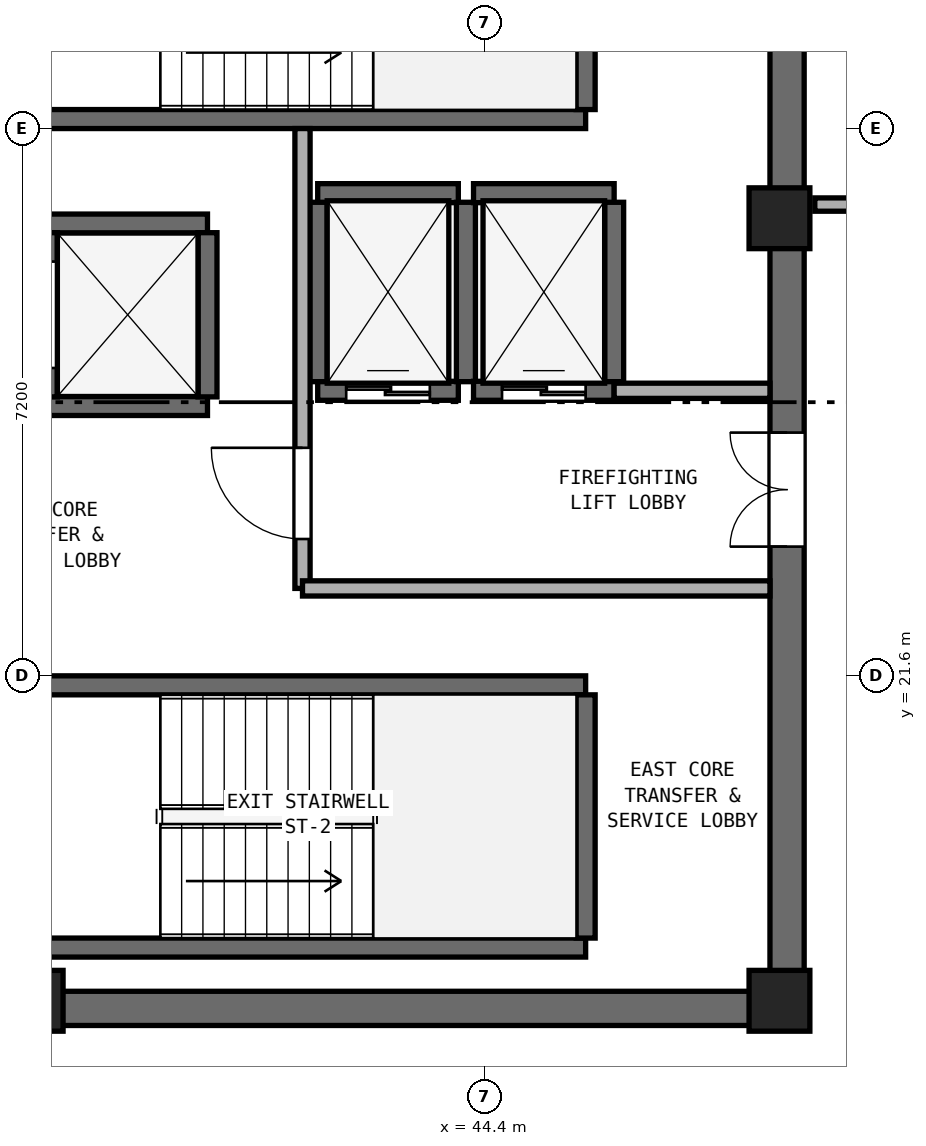
"""IFC4 building model, lengths in metres.
Left out: names, types, materials, properties, quantities, classifications, styles, units other than length and angle.
Written with IfcOpenShell. Run it as: python <this file> out.ifc"""

import sys

from ifc_helpers import new_model, si_unit, direction, frame, frame_2d, origin, origin_2d, place, context, subcontext, project, spatial, rectangle, extrude, element, fill, save


model = new_model("IFC4")
c1 = context("Model", 3, precision=1e-05, world=origin(), true_north=direction((0.0, 1.0)))
c2 = subcontext(c1, "Body", "Model", "MODEL_VIEW")
j1 = project(units=[si_unit("LENGTHUNIT", "METRE"), si_unit("PLANEANGLEUNIT", "RADIAN")], contexts=[c1])
p1 = place(None, origin())
s1 = spatial("IfcSite", under=j1, at=p1, CompositionType="ELEMENT")
p2 = place(p1, origin())
s2 = spatial("IfcBuilding", under=s1, at=p2, CompositionType="ELEMENT")
p3 = place(p2, frame((0.0, 0.0, 266.8)))
s3 = spatial("IfcBuildingStorey", under=s2, at=p3, CompositionType="ELEMENT", Elevation=266.8)
p4 = place(p3, frame((25.4, 17.225, 0.0), z_axis=(0.0, 0.0, 1.0), x_axis=(1.0, 0.0, 0.0)))
e1 = element("IfcWall", 1, at=p4, inside=s3, PredefinedType="SHEAR", context=c2, shape_type="SweptSolid", body=[
    extrude(rectangle(XDim=23.2, YDim=0.45, at=frame_2d((11.6, 0.0))), origin(), (0.0, 0.0, 1.0), 3.51),
])
p5 = place(p3, frame((48.375, 17.45, 0.0), z_axis=(0.0, 0.0, 1.0), x_axis=(0.0, 1.0, 0.0)))
e2 = element("IfcWall", 2, at=p5, inside=s3, PredefinedType="SHEAR", context=c2, shape_type="SweptSolid", body=[
    extrude(rectangle(XDim=15.5, YDim=0.45, at=frame_2d((7.75, 0.0))), origin(), (0.0, 0.0, 1.0), 3.51),
])
p6 = place(p5, frame((5.85, 0.0, 0.0)))
e3 = element("IfcOpeningElement", 3, at=p6, cuts=e2, PredefinedType="OPENING", context=c2, shape_type="SweptSolid", body=[
    extrude(rectangle(XDim=1.5, YDim=2.15, at=frame_2d((0.75, 1.075))), frame((0.0, 0.235, 0.0), z_axis=(0.0, -1.0, 0.0), x_axis=(1.0, 0.0, 0.0)), (0.0, 0.0, 1.0), 0.47),
])
for number, where, z_axis, x_axis in (
    (4, (38.45, 17.325, 0.0), (0.0, 0.0, 1.0), (1.0, 0.0, 0.0)),
    (5, (48.275, 17.325, 0.0), (0.0, 0.0, 1.0), (1.0, 0.0, 0.0)),
    (6, (48.275, 27.62, 0.0), (0.0, 0.0, 1.0), (1.0, 0.0, 0.0)),
):
    element("IfcColumn", number, at=place(p3, frame(where, z_axis=z_axis, x_axis=x_axis)), inside=s3, PredefinedType="PILASTER", context=c2, shape_type="SweptSolid", body=[
        extrude(rectangle(XDim=0.8, YDim=0.8, at=origin_2d()), origin(), (0.0, 0.0, 1.0), 3.8),
    ])
p7 = place(p3, frame((38.425, 28.925, 0.0), z_axis=(0.0, 0.0, 1.0), x_axis=(1.0, 0.0, 0.0)))
e7 = element("IfcWall", 7, at=p7, inside=s3, PredefinedType="SHEAR", context=c2, shape_type="SweptSolid", body=[
    extrude(rectangle(XDim=7.3, YDim=0.25, at=frame_2d((3.65, 0.0))), origin(), (0.0, 0.0, 1.0), 3.51),
])
p8 = place(p3, frame((45.725, 29.05, 0.0), z_axis=(0.0, 0.0, 1.0), x_axis=(0.0, 1.0, 0.0)))
e8 = element("IfcWall", 8, at=p8, inside=s3, PredefinedType="SHEAR", context=c2, shape_type="SweptSolid", body=[
    extrude(rectangle(XDim=3.2, YDim=0.25, at=frame_2d((1.6, 0.0))), origin(), (0.0, 0.0, 1.0), 3.51),
])
for number, where, z_axis, x_axis in (
    (9, (38.425, 18.025, 0.0), (0.0, 0.0, 1.0), (1.0, 0.0, 0.0)),
    (10, (38.425, 21.475, 0.0), (0.0, 0.0, 1.0), (1.0, 0.0, 0.0)),
):
    element("IfcWall", number, at=place(p3, frame(where, z_axis=z_axis, x_axis=x_axis)), inside=s3, PredefinedType="SHEAR", context=c2, shape_type="SweptSolid", body=[
        extrude(rectangle(XDim=7.3, YDim=0.25, at=frame_2d((3.65, 0.0))), origin(), (0.0, 0.0, 1.0), 3.51),
    ])
p9 = place(p3, frame((45.725, 18.15, 0.0), z_axis=(0.0, 0.0, 1.0), x_axis=(0.0, 1.0, 0.0)))
e11 = element("IfcWall", 11, at=p9, inside=s3, PredefinedType="SHEAR", context=c2, shape_type="SweptSolid", body=[
    extrude(rectangle(XDim=3.2, YDim=0.25, at=frame_2d((1.6, 0.0))), origin(), (0.0, 0.0, 1.0), 3.51),
])
p10 = place(p3, frame((42.2, 25.35, 0.0), z_axis=(0.0, 0.0, 1.0), x_axis=(1.0, 0.0, 0.0)))
e12 = element("IfcWall", 12, at=p10, inside=s3, PredefinedType="SHEAR", context=c2, shape_type="SweptSolid", body=[
    extrude(rectangle(XDim=1.85, YDim=0.25, at=frame_2d((0.925, 0.0))), origin(), (0.0, 0.0, 1.0), 3.51),
])
p11 = place(p10, frame((0.375, 0.0, 0.0)))
e13 = element("IfcOpeningElement", 13, at=p11, cuts=e12, PredefinedType="OPENING", context=c2, shape_type="SweptSolid", body=[
    extrude(rectangle(XDim=1.1, YDim=2.15, at=frame_2d((0.55, 1.075))), frame((0.0, 0.135, 0.0), z_axis=(0.0, -1.0, 0.0), x_axis=(1.0, 0.0, 0.0)), (0.0, 0.0, 1.0), 0.27),
])
p12 = place(p3, frame((42.2, 27.95, 0.0), z_axis=(0.0, 0.0, 1.0), x_axis=(1.0, 0.0, 0.0)))
e14 = element("IfcWall", 14, at=p12, inside=s3, PredefinedType="SHEAR", context=c2, shape_type="SweptSolid", body=[
    extrude(rectangle(XDim=1.85, YDim=0.25, at=frame_2d((0.925, 0.0))), origin(), (0.0, 0.0, 1.0), 3.51),
])
for number, where, z_axis, x_axis in (
    (15, (42.2, 25.47, 0.0), (0.0, 0.0, 1.0), (0.0, 1.0, 0.0)),
    (16, (44.15, 25.47, 0.0), (0.0, 0.0, 1.0), (0.0, 1.0, 0.0)),
):
    element("IfcWall", number, at=place(p3, frame(where, z_axis=z_axis, x_axis=x_axis)), inside=s3, PredefinedType="SHEAR", context=c2, shape_type="SweptSolid", body=[
        extrude(rectangle(XDim=2.36, YDim=0.25, at=frame_2d((1.18, 0.0))), origin(), (0.0, 0.0, 1.0), 3.51),
    ])
p13 = place(p3, frame((44.25, 25.35, 0.0), z_axis=(0.0, 0.0, 1.0), x_axis=(1.0, 0.0, 0.0)))
e17 = element("IfcWall", 17, at=p13, inside=s3, PredefinedType="SHEAR", context=c2, shape_type="SweptSolid", body=[
    extrude(rectangle(XDim=1.85, YDim=0.25, at=frame_2d((0.925, 0.0))), origin(), (0.0, 0.0, 1.0), 3.51),
])
p14 = place(p13, frame((0.375, 0.0, 0.0)))
e18 = element("IfcOpeningElement", 18, at=p14, cuts=e17, PredefinedType="OPENING", context=c2, shape_type="SweptSolid", body=[
    extrude(rectangle(XDim=1.1, YDim=2.15, at=frame_2d((0.55, 1.075))), frame((0.0, 0.135, 0.0), z_axis=(0.0, -1.0, 0.0), x_axis=(1.0, 0.0, 0.0)), (0.0, 0.0, 1.0), 0.27),
])
p15 = place(p3, frame((44.25, 27.95, 0.0), z_axis=(0.0, 0.0, 1.0), x_axis=(1.0, 0.0, 0.0)))
e19 = element("IfcWall", 19, at=p15, inside=s3, PredefinedType="SHEAR", context=c2, shape_type="SweptSolid", body=[
    extrude(rectangle(XDim=1.85, YDim=0.25, at=frame_2d((0.925, 0.0))), origin(), (0.0, 0.0, 1.0), 3.51),
])
p16 = place(p3, frame((46.1, 25.47, 0.0), z_axis=(0.0, 0.0, 1.0), x_axis=(0.0, 1.0, 0.0)))
e20 = element("IfcWall", 20, at=p16, inside=s3, PredefinedType="SHEAR", context=c2, shape_type="SweptSolid", body=[
    extrude(rectangle(XDim=2.36, YDim=0.25, at=frame_2d((1.18, 0.0))), origin(), (0.0, 0.0, 1.0), 3.51),
])
for number, where, z_axis, x_axis in (
    (21, (38.65, 25.15, 0.0), (0.0, 0.0, 1.0), (1.0, 0.0, 0.0)),
    (22, (38.65, 27.55, 0.0), (0.0, 0.0, 1.0), (1.0, 0.0, 0.0)),
):
    element("IfcWall", number, at=place(p3, frame(where, z_axis=z_axis, x_axis=x_axis)), inside=s3, PredefinedType="SHEAR", context=c2, shape_type="SweptSolid", body=[
        extrude(rectangle(XDim=2.1, YDim=0.25, at=frame_2d((1.05, 0.0))), origin(), (0.0, 0.0, 1.0), 3.51),
    ])
p17 = place(p3, frame((38.65, 25.27, 0.0), z_axis=(0.0, 0.0, 1.0), x_axis=(0.0, 1.0, 0.0)))
e23 = element("IfcWall", 23, at=p17, inside=s3, PredefinedType="SHEAR", context=c2, shape_type="SweptSolid", body=[
    extrude(rectangle(XDim=2.16, YDim=0.25, at=frame_2d((1.08, 0.0))), origin(), (0.0, 0.0, 1.0), 3.51),
])
p18 = place(p17, frame((0.38, 0.0, 0.0)))
e24 = element("IfcOpeningElement", 24, at=p18, cuts=e23, PredefinedType="OPENING", context=c2, shape_type="SweptSolid", body=[
    extrude(rectangle(XDim=1.4, YDim=2.2, at=frame_2d((0.7, 1.1))), frame((0.0, 0.135, 0.0), z_axis=(0.0, -1.0, 0.0), x_axis=(1.0, 0.0, 0.0)), (0.0, 0.0, 1.0), 0.27),
])
p19 = place(p3, frame((40.75, 25.27, 0.0), z_axis=(0.0, 0.0, 1.0), x_axis=(0.0, 1.0, 0.0)))
e25 = element("IfcWall", 25, at=p19, inside=s3, PredefinedType="SHEAR", context=c2, shape_type="SweptSolid", body=[
    extrude(rectangle(XDim=2.16, YDim=0.25, at=frame_2d((1.08, 0.0))), origin(), (0.0, 0.0, 1.0), 3.51),
])
p20 = place(p3, frame((42.0, 22.75, 0.0), z_axis=(0.0, 0.0, 1.0), x_axis=(0.0, 1.0, 0.0)))
e26 = element("IfcWall", 26, at=p20, inside=s3, PredefinedType="SOLIDWALL", context=c2, shape_type="SweptSolid", body=[
    extrude(rectangle(XDim=6.05, YDim=0.2, at=frame_2d((3.025, 0.0))), origin(), (0.0, 0.0, 1.0), 3.51),
])
p21 = place(p20, frame((0.65, 0.0, 0.0)))
e27 = element("IfcOpeningElement", 27, at=p21, cuts=e26, PredefinedType="OPENING", context=c2, shape_type="SweptSolid", body=[
    extrude(rectangle(XDim=1.2, YDim=2.15, at=frame_2d((0.6, 1.075))), frame((0.0, 0.11, 0.0), z_axis=(0.0, -1.0, 0.0), x_axis=(1.0, 0.0, 0.0)), (0.0, 0.0, 1.0), 0.22),
])
p22 = place(p3, frame((42.0, 22.75, 0.0), z_axis=(0.0, 0.0, 1.0), x_axis=(1.0, 0.0, 0.0)))
e28 = element("IfcWall", 28, at=p22, inside=s3, PredefinedType="SOLIDWALL", context=c2, shape_type="SweptSolid", body=[
    extrude(rectangle(XDim=6.15, YDim=0.2, at=frame_2d((3.075, 0.0))), origin(), (0.0, 0.0, 1.0), 3.51),
])
p23 = place(p3, frame((46.1, 25.35, 0.0), z_axis=(0.0, 0.0, 1.0), x_axis=(1.0, 0.0, 0.0)))
e29 = element("IfcWall", 29, at=p23, inside=s3, PredefinedType="SOLIDWALL", context=c2, shape_type="SweptSolid", body=[
    extrude(rectangle(XDim=2.05, YDim=0.2, at=frame_2d((1.025, 0.0))), origin(), (0.0, 0.0, 1.0), 3.51),
])
p24 = place(p3, frame((48.74, 27.8, 0.0), z_axis=(0.0, 0.0, 1.0), x_axis=(1.0, 0.0, 0.0)))
e30 = element("IfcWall", 30, at=p24, inside=s3, PredefinedType="PARTITIONING", context=c2, shape_type="SweptSolid", body=[
    extrude(rectangle(XDim=3.71, YDim=0.175, at=frame_2d((1.855, 0.0))), origin(), (0.0, 0.0, 1.0), 3.51),
])
p25 = place(p24, frame((1.405, 0.0, 0.0)))
e31 = element("IfcOpeningElement", 31, at=p25, cuts=e30, PredefinedType="OPENING", context=c2, shape_type="SweptSolid", body=[
    extrude(rectangle(XDim=0.9, YDim=2.1, at=frame_2d((0.45, 1.05))), frame((0.0, 0.097, 0.0), z_axis=(0.0, -1.0, 0.0), x_axis=(1.0, 0.0, 0.0)), (0.0, 0.0, 1.0), 0.195),
])
p26 = place(p11, origin())
e32 = element("IfcDoor", 32, at=p26, inside=s3, OperationType="DOUBLE_DOOR_SLIDING", PredefinedType="DOOR", context=c2, shape_type="SweptSolid", body=[
    extrude(rectangle(XDim=1.1, YDim=2.15, at=frame_2d((0.55, 1.075))), frame((0.0, 0.025, 0.0), z_axis=(0.0, -1.0, 0.0), x_axis=(1.0, 0.0, 0.0)), (0.0, 0.0, 1.0), 0.05),
])
fill(e13, e32)
p27 = place(p14, origin())
e33 = element("IfcDoor", 33, at=p27, inside=s3, OperationType="DOUBLE_DOOR_SLIDING", PredefinedType="DOOR", context=c2, shape_type="SweptSolid", body=[
    extrude(rectangle(XDim=1.1, YDim=2.15, at=frame_2d((0.55, 1.075))), frame((0.0, 0.025, 0.0), z_axis=(0.0, -1.0, 0.0), x_axis=(1.0, 0.0, 0.0)), (0.0, 0.0, 1.0), 0.05),
])
fill(e18, e33)
p28 = place(p21, origin())
e34 = element("IfcDoor", 34, at=p28, inside=s3, OperationType="SINGLE_SWING_RIGHT", PredefinedType="DOOR", context=c2, shape_type="SweptSolid", body=[
    extrude(rectangle(XDim=1.2, YDim=2.15, at=frame_2d((0.6, 1.075))), frame((0.0, 0.025, 0.0), z_axis=(0.0, -1.0, 0.0), x_axis=(1.0, 0.0, 0.0)), (0.0, 0.0, 1.0), 0.05),
])
fill(e27, e34)
p29 = place(p6, origin())
e35 = element("IfcDoor", 35, at=p29, inside=s3, OperationType="DOUBLE_DOOR_SINGLE_SWING", PredefinedType="DOOR", context=c2, shape_type="SweptSolid", body=[
    extrude(rectangle(XDim=1.5, YDim=2.15, at=frame_2d((0.75, 1.075))), frame((0.0, 0.025, 0.0), z_axis=(0.0, -1.0, 0.0), x_axis=(1.0, 0.0, 0.0)), (0.0, 0.0, 1.0), 0.05),
])
fill(e3, e35)
save(model, sys.argv[1])
